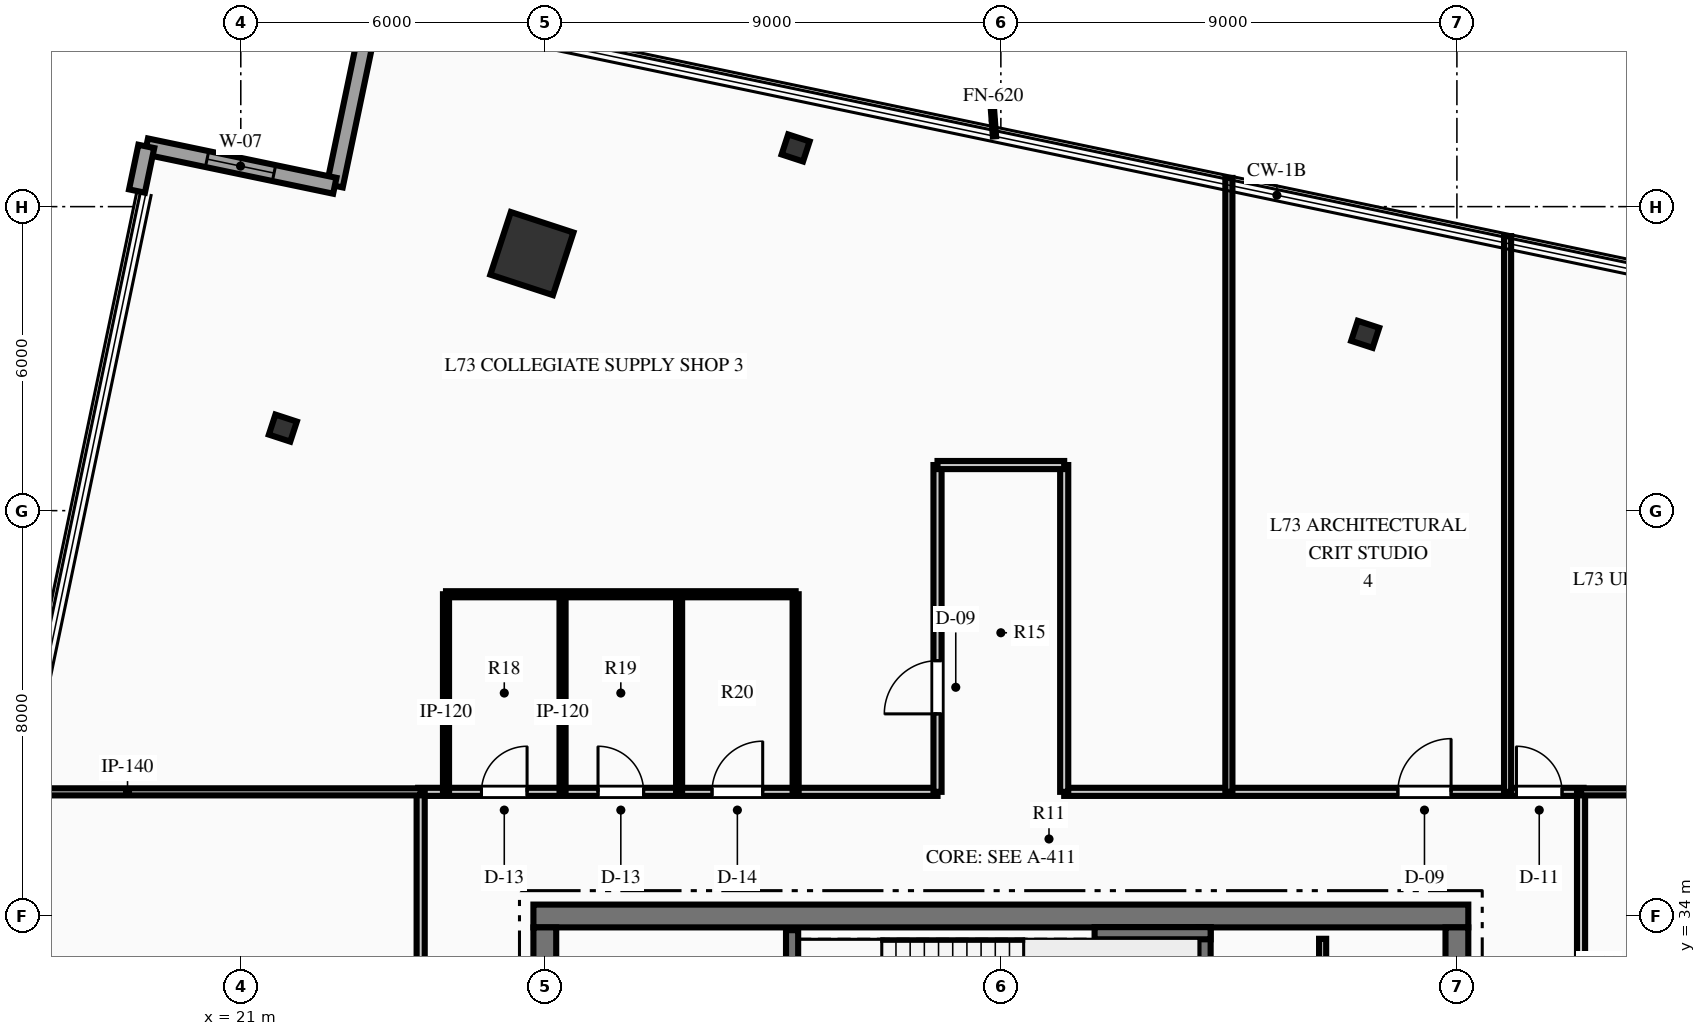
"""IFC4 building model, lengths in metres.
Left out: names, types, materials, properties, quantities, classifications, styles, units other than length and angle.
Written with IfcOpenShell. Run it as: python <this file> out.ifc"""

import sys

from ifc_helpers import new_model, si_unit, direction, frame, frame_2d, origin, origin_2d, place, context, subcontext, project, spatial, rectangle, hollow_rectangle, i_section, extrude, element, fill, save


model = new_model("IFC4")
c1 = context("Model", 3, precision=1e-05, world=origin(), true_north=direction((0.0, 1.0)))
c2 = subcontext(c1, "Body", "Model", "MODEL_VIEW")
j1 = project(units=[si_unit("LENGTHUNIT", "METRE"), si_unit("PLANEANGLEUNIT", "RADIAN")], contexts=[c1])
p1 = place(None, origin())
s1 = spatial("IfcSite", under=j1, at=p1, CompositionType="ELEMENT")
p2 = place(p1, origin())
s2 = spatial("IfcBuilding", under=s1, at=p2, CompositionType="ELEMENT")
p3 = place(p2, frame((0.0, 0.0, 289.95)))
s3 = spatial("IfcBuildingStorey", under=s2, at=p3, CompositionType="ELEMENT", Elevation=289.95)
p4 = place(p3, frame((26.775, 34.0, 0.0), z_axis=(0.0, 0.0, 1.0), x_axis=(1.0, 0.0, 0.0)))
e1 = element("IfcWall", 1, at=p4, inside=s3, PredefinedType="SHEAR", context=c2, shape_type="SweptSolid", body=[
    extrude(rectangle(XDim=18.45, YDim=0.45, at=frame_2d((9.225, 0.0))), origin(), (0.0, 0.0, 1.0), 3.75),
])
p5 = place(p3, frame((27.0, 18.225, 0.0), z_axis=(0.0, 0.0, 1.0), x_axis=(0.0, 1.0, 0.0)))
e2 = element("IfcWall", 2, at=p5, inside=s3, PredefinedType="SHEAR", context=c2, shape_type="SweptSolid", body=[
    extrude(rectangle(XDim=15.55, YDim=0.45, at=frame_2d((7.775, 0.0))), origin(), (0.0, 0.0, 1.0), 3.75),
])
p6 = place(p5, frame((10.015, 0.0, 0.0)))
e3 = element("IfcOpeningElement", 3, at=p6, cuts=e2, PredefinedType="OPENING", context=c2, shape_type="SweptSolid", body=[
    extrude(rectangle(XDim=1.4, YDim=2.2, at=frame_2d((0.7, 1.1))), frame((0.0, 0.235, 0.0), z_axis=(0.0, -1.0, 0.0), x_axis=(1.0, 0.0, 0.0)), (0.0, 0.0, 1.0), 0.47),
])
p7 = place(p3, frame((45.0, 18.225, 0.0), z_axis=(0.0, 0.0, 1.0), x_axis=(0.0, 1.0, 0.0)))
e4 = element("IfcWall", 4, at=p7, inside=s3, PredefinedType="SHEAR", context=c2, shape_type="SweptSolid", body=[
    extrude(rectangle(XDim=15.55, YDim=0.45, at=frame_2d((7.775, 0.0))), origin(), (0.0, 0.0, 1.0), 3.75),
])
p8 = place(p7, frame((10.015, 0.0, 0.0)))
e5 = element("IfcOpeningElement", 5, at=p8, cuts=e4, PredefinedType="OPENING", context=c2, shape_type="SweptSolid", body=[
    extrude(rectangle(XDim=1.4, YDim=2.2, at=frame_2d((0.7, 1.1))), frame((0.0, 0.235, 0.0), z_axis=(0.0, -1.0, 0.0), x_axis=(1.0, 0.0, 0.0)), (0.0, 0.0, 1.0), 0.47),
])
p9 = place(p3, frame((31.88, 29.93, 0.0), z_axis=(0.0, 0.0, 1.0), x_axis=(0.0, 1.0, 0.0)))
e6 = element("IfcWall", 6, at=p9, inside=s3, PredefinedType="SHEAR", context=c2, shape_type="SweptSolid", body=[
    extrude(rectangle(XDim=3.79, YDim=0.24, at=frame_2d((1.895, 0.0))), origin(), (0.0, 0.0, 1.0), 3.75),
])
p10 = place(p3, frame((40.02, 29.93, 0.0), z_axis=(0.0, 0.0, 1.0), x_axis=(0.0, 1.0, 0.0)))
e7 = element("IfcWall", 7, at=p10, inside=s3, PredefinedType="SHEAR", context=c2, shape_type="SweptSolid", body=[
    extrude(rectangle(XDim=3.85, YDim=0.24, at=frame_2d((1.925, 0.0))), origin(), (0.0, 0.0, 1.0), 3.75),
])
p11 = place(p3, frame((37.85, 33.66, 0.0), z_axis=(0.0, 0.0, 1.0), x_axis=(1.0, 0.0, 0.0)))
e8 = element("IfcWall", 8, at=p11, inside=s3, PredefinedType="SHEAR", context=c2, shape_type="SweptSolid", body=[
    extrude(rectangle(XDim=2.29, YDim=0.24, at=frame_2d((1.145, 0.0))), origin(), (0.0, 0.0, 1.0), 3.75),
])
p12 = place(p3, frame((26.745, 47.073, 0.0), z_axis=(0.0, 0.0, 1.0), x_axis=(0.311008203279, 0.950407227189, 0.0)))
e9 = element("IfcColumn", 9, at=p12, inside=s3, PredefinedType="COLUMN", context=c2, shape_type="SweptSolid", body=[
    extrude(hollow_rectangle(XDim=1.3, YDim=1.3, WallThickness=0.06, at=origin_2d()), origin(), (0.0, 0.0, 1.0), 3.75),
])
for number, where, z_axis, x_axis in (
    (10, (43.19, 45.48, 0.0), (0.0, 0.0, 1.0), (0.311, 0.95, 0.0)),
    (11, (31.949, 49.158, 0.0), (0.0, 0.0, 1.0), (0.311, 0.95, 0.0)),
    (12, (21.83, 43.629, 0.0), (0.0, 0.0, 1.0), (0.311, 0.95, 0.0)),
):
    element("IfcColumn", number, at=place(p3, frame(where, z_axis=z_axis, x_axis=x_axis)), inside=s3, PredefinedType="COLUMN", context=c2, shape_type="SweptSolid", body=[
        extrude(i_section(OverallWidth=0.416, OverallDepth=0.445, WebThickness=0.039, FlangeThickness=0.063, at=origin_2d()), origin(), (0.0, 0.0, 1.0), 3.75),
    ])
p13 = place(p3, frame((22.855, 48.412, 0.0), z_axis=(0.0, 0.0, 1.0), x_axis=(0.204498130493, 0.978866954506, 0.0)))
e13 = element("IfcWall", 13, at=p13, inside=s3, PredefinedType="STANDARD", context=c2, shape_type="SweptSolid", body=[
    extrude(rectangle(XDim=3.8, YDim=0.32, at=frame_2d((1.9, 0.0))), origin(), (0.0, 0.0, 1.0), 3.34),
])
p14 = place(p3, frame((19.135, 49.189, 0.0), z_axis=(0.0, 0.0, 1.0), x_axis=(0.978866954506, -0.204498130493, 0.0)))
e14 = element("IfcWall", 14, at=p14, inside=s3, PredefinedType="STANDARD", context=c2, shape_type="SweptSolid", body=[
    extrude(rectangle(XDim=3.8, YDim=0.32, at=frame_2d((1.9, 0.0))), origin(), (0.0, 0.0, 1.0), 3.34),
])
p15 = place(p14, frame((1.225, 0.0, 0.85)))
e15 = element("IfcOpeningElement", 15, at=p15, cuts=e14, PredefinedType="OPENING", context=c2, shape_type="SweptSolid", body=[
    extrude(rectangle(XDim=1.35, YDim=1.95, at=frame_2d((0.675, 0.975))), frame((0.0, 0.17, 0.0), z_axis=(0.0, -1.0, 0.0), x_axis=(1.0, 0.0, 0.0)), (0.0, 0.0, 1.0), 0.34),
])
p16 = place(p3, frame((18.952, 48.308, 0.0), z_axis=(0.0, 0.0, 1.0), x_axis=(0.20424670106, 0.978919447711, 0.0)))
e16 = element("IfcWall", 16, at=p16, inside=s3, PredefinedType="STANDARD", context=c2, shape_type="SweptSolid", body=[
    extrude(rectangle(XDim=0.9, YDim=0.32, at=frame_2d((0.45, 0.0))), origin(), (0.0, 0.0, 1.0), 3.34),
])
p17 = place(p3, frame((42.35, 29.95, 0.0), z_axis=(0.0, 0.0, 1.0), x_axis=(0.0, 1.0, 0.0)))
e17 = element("IfcWall", 17, at=p17, inside=s3, PredefinedType="PARTITIONING", context=c2, shape_type="SweptSolid", body=[
    extrude(rectangle(XDim=3.6, YDim=0.14, at=frame_2d((1.8, 0.0))), origin(), (0.0, 0.0, 1.0), 3.34),
])
p18 = place(p3, frame((24.5, 36.45, 0.0), z_axis=(0.0, 0.0, 1.0), x_axis=(1.0, 0.0, 0.0)))
e18 = element("IfcWall", 18, at=p18, inside=s3, PredefinedType="PARTITIONING", context=c2, shape_type="SweptSolid", body=[
    extrude(rectangle(XDim=10.25, YDim=0.16, at=frame_2d((5.125, 0.0))), origin(), (0.0, 0.0, 1.0), 3.34),
])
p19 = place(p18, frame((1.25, 0.0, 0.0)))
e19 = element("IfcOpeningElement", 19, at=p19, cuts=e18, PredefinedType="OPENING", context=c2, shape_type="SweptSolid", body=[
    extrude(rectangle(XDim=0.9, YDim=2.15, at=frame_2d((0.45, 1.075))), frame((0.0, 0.09, 0.0), z_axis=(0.0, -1.0, 0.0), x_axis=(1.0, 0.0, 0.0)), (0.0, 0.0, 1.0), 0.18),
])
p20 = place(p18, frame((3.55, 0.0, 0.0)))
e20 = element("IfcOpeningElement", 20, at=p20, cuts=e18, PredefinedType="OPENING", context=c2, shape_type="SweptSolid", body=[
    extrude(rectangle(XDim=0.9, YDim=2.15, at=frame_2d((0.45, 1.075))), frame((0.0, 0.09, 0.0), z_axis=(0.0, -1.0, 0.0), x_axis=(1.0, 0.0, 0.0)), (0.0, 0.0, 1.0), 0.18),
])
p21 = place(p18, frame((5.8, 0.0, 0.0)))
e21 = element("IfcOpeningElement", 21, at=p21, cuts=e18, PredefinedType="OPENING", context=c2, shape_type="SweptSolid", body=[
    extrude(rectangle(XDim=1.0, YDim=2.15, at=frame_2d((0.5, 1.075))), frame((0.0, 0.09, 0.0), z_axis=(0.0, -1.0, 0.0), x_axis=(1.0, 0.0, 0.0)), (0.0, 0.0, 1.0), 0.18),
])
p22 = place(p3, frame((37.25, 36.45, 0.0), z_axis=(0.0, 0.0, 1.0), x_axis=(1.0, 0.0, 0.0)))
e22 = element("IfcWall", 22, at=p22, inside=s3, PredefinedType="PARTITIONING", context=c2, shape_type="SweptSolid", body=[
    extrude(rectangle(XDim=10.25, YDim=0.16, at=frame_2d((5.125, 0.0))), origin(), (0.0, 0.0, 1.0), 3.34),
])
p23 = place(p22, frame((6.585, 0.0, 0.0)))
e23 = element("IfcOpeningElement", 23, at=p23, cuts=e22, PredefinedType="OPENING", context=c2, shape_type="SweptSolid", body=[
    extrude(rectangle(XDim=1.05, YDim=2.15, at=frame_2d((0.525, 1.075))), frame((0.0, 0.09, 0.0), z_axis=(0.0, -1.0, 0.0), x_axis=(1.0, 0.0, 0.0)), (0.0, 0.0, 1.0), 0.18),
])
p24 = place(p22, frame((8.925, 0.0, 0.0)))
e24 = element("IfcOpeningElement", 24, at=p24, cuts=e22, PredefinedType="OPENING", context=c2, shape_type="SweptSolid", body=[
    extrude(rectangle(XDim=0.9, YDim=2.15, at=frame_2d((0.45, 1.075))), frame((0.0, 0.09, 0.0), z_axis=(0.0, -1.0, 0.0), x_axis=(1.0, 0.0, 0.0)), (0.0, 0.0, 1.0), 0.18),
])
p25 = place(p3, frame((24.55, 27.25, 0.0), z_axis=(0.0, 0.0, 1.0), x_axis=(0.0, 1.0, 0.0)))
e25 = element("IfcWall", 25, at=p25, inside=s3, PredefinedType="PARTITIONING", context=c2, shape_type="SweptSolid", body=[
    extrude(rectangle(XDim=9.2, YDim=0.16, at=frame_2d((4.6, 0.0))), origin(), (0.0, 0.0, 1.0), 3.34),
])
p26 = place(p25, frame((2.419, 0.0, 0.0)))
e26 = element("IfcOpeningElement", 26, at=p26, cuts=e25, PredefinedType="OPENING", context=c2, shape_type="SweptSolid", body=[
    extrude(rectangle(XDim=1.05, YDim=2.15, at=frame_2d((0.525, 1.075))), frame((0.0, 0.09, 0.0), z_axis=(0.0, -1.0, 0.0), x_axis=(1.0, 0.0, 0.0)), (0.0, 0.0, 1.0), 0.18),
])
p27 = place(p3, frame((47.45, 27.25, 0.0), z_axis=(0.0, 0.0, 1.0), x_axis=(0.0, 1.0, 0.0)))
e27 = element("IfcWall", 27, at=p27, inside=s3, PredefinedType="PARTITIONING", context=c2, shape_type="SweptSolid", body=[
    extrude(rectangle(XDim=9.2, YDim=0.16, at=frame_2d((4.6, 0.0))), origin(), (0.0, 0.0, 1.0), 3.34),
])
p28 = place(p27, frame((3.927, 0.0, 0.0)))
e28 = element("IfcOpeningElement", 28, at=p28, cuts=e27, PredefinedType="OPENING", context=c2, shape_type="SweptSolid", body=[
    extrude(rectangle(XDim=1.05, YDim=2.15, at=frame_2d((0.525, 1.075))), frame((0.0, 0.09, 0.0), z_axis=(0.0, -1.0, 0.0), x_axis=(1.0, 0.0, 0.0)), (0.0, 0.0, 1.0), 0.18),
])
p29 = place(p3, frame((34.75, 36.45, 0.0), z_axis=(0.0, 0.0, 1.0), x_axis=(0.0, 1.0, 0.0)))
e29 = element("IfcWall", 29, at=p29, inside=s3, PredefinedType="PARTITIONING", context=c2, shape_type="SweptSolid", body=[
    extrude(rectangle(XDim=6.45, YDim=0.16, at=frame_2d((3.225, 0.0))), origin(), (0.0, 0.0, 1.0), 3.34),
])
p30 = place(p29, frame((1.539, 0.0, 0.0)))
e30 = element("IfcOpeningElement", 30, at=p30, cuts=e29, PredefinedType="OPENING", context=c2, shape_type="SweptSolid", body=[
    extrude(rectangle(XDim=1.05, YDim=2.15, at=frame_2d((0.525, 1.075))), frame((0.0, 0.09, 0.0), z_axis=(0.0, -1.0, 0.0), x_axis=(1.0, 0.0, 0.0)), (0.0, 0.0, 1.0), 0.18),
])
p31 = place(p3, frame((37.25, 36.45, 0.0), z_axis=(0.0, 0.0, 1.0), x_axis=(0.0, 1.0, 0.0)))
e31 = element("IfcWall", 31, at=p31, inside=s3, PredefinedType="PARTITIONING", context=c2, shape_type="SweptSolid", body=[
    extrude(rectangle(XDim=6.45, YDim=0.16, at=frame_2d((3.225, 0.0))), origin(), (0.0, 0.0, 1.0), 3.34),
])
p32 = place(p3, frame((34.75, 42.9, 0.0), z_axis=(0.0, 0.0, 1.0), x_axis=(1.0, 0.0, 0.0)))
e32 = element("IfcWall", 32, at=p32, inside=s3, PredefinedType="PARTITIONING", context=c2, shape_type="SweptSolid", body=[
    extrude(rectangle(XDim=2.5, YDim=0.16, at=frame_2d((1.25, 0.0))), origin(), (0.0, 0.0, 1.0), 3.34),
])
for number, where, z_axis, x_axis in (
    (33, (25.05, 36.45, 0.0), (0.0, 0.0, 1.0), (0.0, 1.0, 0.0)),
    (34, (27.35, 36.45, 0.0), (0.0, 0.0, 1.0), (0.0, 1.0, 0.0)),
    (35, (29.65, 36.45, 0.0), (0.0, 0.0, 1.0), (0.0, 1.0, 0.0)),
):
    element("IfcWall", number, at=place(p3, frame(where, z_axis=z_axis, x_axis=x_axis)), inside=s3, PredefinedType="PARTITIONING", context=c2, shape_type="SweptSolid", body=[
        extrude(rectangle(XDim=3.9, YDim=0.12, at=frame_2d((1.95, 0.0))), origin(), (0.0, 0.0, 1.0), 3.34),
    ])
p33 = place(p3, frame((31.95, 36.45, 0.0), z_axis=(0.0, 0.0, 1.0), x_axis=(0.0, 1.0, 0.0)))
e36 = element("IfcWall", 36, at=p33, inside=s3, PredefinedType="PARTITIONING", context=c2, shape_type="SweptSolid", body=[
    extrude(rectangle(XDim=3.9, YDim=0.12, at=frame_2d((1.95, 0.0))), origin(), (0.0, 0.0, 1.0), 2.718),
])
p34 = place(p3, frame((25.05, 40.35, 0.0), z_axis=(0.0, 0.0, 1.0), x_axis=(1.0, 0.0, 0.0)))
e37 = element("IfcWall", 37, at=p34, inside=s3, PredefinedType="PARTITIONING", context=c2, shape_type="SweptSolid", body=[
    extrude(rectangle(XDim=6.9, YDim=0.12, at=frame_2d((3.45, 0.0))), origin(), (0.0, 0.0, 1.0), 3.34),
])
p35 = place(p3, frame((16.515, 36.45, 0.0), z_axis=(0.0, 0.0, 1.0), x_axis=(1.0, 0.0, 0.0)))
e38 = element("IfcWall", 38, at=p35, inside=s3, PredefinedType="PARTITIONING", context=c2, shape_type="SweptSolid", body=[
    extrude(rectangle(XDim=8.035, YDim=0.14, at=frame_2d((4.018, 0.0))), origin(), (0.0, 0.0, 1.0), 3.34),
])
p36 = place(p3, frame((47.45, 36.45, 0.0), z_axis=(0.0, 0.0, 1.0), x_axis=(1.0, 0.0, 0.0)))
e39 = element("IfcWall", 39, at=p36, inside=s3, PredefinedType="PARTITIONING", context=c2, shape_type="SweptSolid", body=[
    extrude(rectangle(XDim=14.01, YDim=0.14, at=frame_2d((7.005, 0.0))), origin(), (0.0, 0.0, 1.0), 2.718),
])
p37 = place(p3, frame((40.5, 36.45, 0.0), z_axis=(0.0, 0.0, 1.0), x_axis=(0.0, 1.0, 0.0)))
e40 = element("IfcWall", 40, at=p37, inside=s3, PredefinedType="PARTITIONING", context=c2, shape_type="SweptSolid", body=[
    extrude(rectangle(XDim=12.117, YDim=0.14, at=frame_2d((6.058, 0.0))), origin(), (0.0, 0.0, 1.0), 3.34),
])
p38 = place(p3, frame((46.0, 36.45, 0.0), z_axis=(0.0, 0.0, 1.0), x_axis=(0.0, 1.0, 0.0)))
e41 = element("IfcWall", 41, at=p38, inside=s3, PredefinedType="PARTITIONING", context=c2, shape_type="SweptSolid", body=[
    extrude(rectangle(XDim=10.968, YDim=0.14, at=frame_2d((5.484, 0.0))), origin(), (0.0, 0.0, 1.0), 3.34),
])
p39 = place(p15, origin())
e42 = element("IfcWindow", 42, at=p39, inside=s3, PartitioningType="SINGLE_PANEL", PredefinedType="WINDOW", context=c2, shape_type="SweptSolid", body=[
    extrude(rectangle(XDim=1.35, YDim=1.95, at=frame_2d((0.675, 0.975))), frame((0.0, 0.03, 0.0), z_axis=(0.0, -1.0, 0.0), x_axis=(1.0, 0.0, 0.0)), (0.0, 0.0, 1.0), 0.06),
])
fill(e15, e42)
p40 = place(p19, origin())
e43 = element("IfcDoor", 43, at=p40, inside=s3, OperationType="SINGLE_SWING_RIGHT", PredefinedType="DOOR", context=c2, shape_type="SweptSolid", body=[
    extrude(rectangle(XDim=0.9, YDim=2.15, at=frame_2d((0.45, 1.075))), frame((0.0, 0.025, 0.0), z_axis=(0.0, -1.0, 0.0), x_axis=(1.0, 0.0, 0.0)), (0.0, 0.0, 1.0), 0.05),
])
fill(e19, e43)
p41 = place(p20, origin())
e44 = element("IfcDoor", 44, at=p41, inside=s3, OperationType="SINGLE_SWING_LEFT", PredefinedType="DOOR", context=c2, shape_type="SweptSolid", body=[
    extrude(rectangle(XDim=0.9, YDim=2.15, at=frame_2d((0.45, 1.075))), frame((0.0, 0.025, 0.0), z_axis=(0.0, -1.0, 0.0), x_axis=(1.0, 0.0, 0.0)), (0.0, 0.0, 1.0), 0.05),
])
fill(e20, e44)
p42 = place(p21, origin())
e45 = element("IfcDoor", 45, at=p42, inside=s3, OperationType="SINGLE_SWING_RIGHT", PredefinedType="DOOR", context=c2, shape_type="SweptSolid", body=[
    extrude(rectangle(XDim=1.0, YDim=2.15, at=frame_2d((0.5, 1.075))), frame((0.0, 0.025, 0.0), z_axis=(0.0, -1.0, 0.0), x_axis=(1.0, 0.0, 0.0)), (0.0, 0.0, 1.0), 0.05),
])
fill(e21, e45)
p43 = place(p30, origin())
e46 = element("IfcDoor", 46, at=p43, inside=s3, OperationType="SINGLE_SWING_LEFT", PredefinedType="DOOR", context=c2, shape_type="SweptSolid", body=[
    extrude(rectangle(XDim=1.05, YDim=2.15, at=frame_2d((0.525, 1.075))), frame((0.0, 0.025, 0.0), z_axis=(0.0, -1.0, 0.0), x_axis=(1.0, 0.0, 0.0)), (0.0, 0.0, 1.0), 0.05),
])
fill(e30, e46)
p44 = place(p23, origin())
e47 = element("IfcDoor", 47, at=p44, inside=s3, OperationType="SINGLE_SWING_RIGHT", PredefinedType="DOOR", context=c2, shape_type="SweptSolid", body=[
    extrude(rectangle(XDim=1.05, YDim=2.15, at=frame_2d((0.525, 1.075))), frame((0.0, 0.025, 0.0), z_axis=(0.0, -1.0, 0.0), x_axis=(1.0, 0.0, 0.0)), (0.0, 0.0, 1.0), 0.05),
])
fill(e23, e47)
p45 = place(p24, origin())
e48 = element("IfcDoor", 48, at=p45, inside=s3, OperationType="SINGLE_SWING_LEFT", PredefinedType="DOOR", context=c2, shape_type="SweptSolid", body=[
    extrude(rectangle(XDim=0.9, YDim=2.15, at=frame_2d((0.45, 1.075))), frame((0.0, 0.025, 0.0), z_axis=(0.0, -1.0, 0.0), x_axis=(1.0, 0.0, 0.0)), (0.0, 0.0, 1.0), 0.05),
])
fill(e24, e48)
save(model, sys.argv[1])
